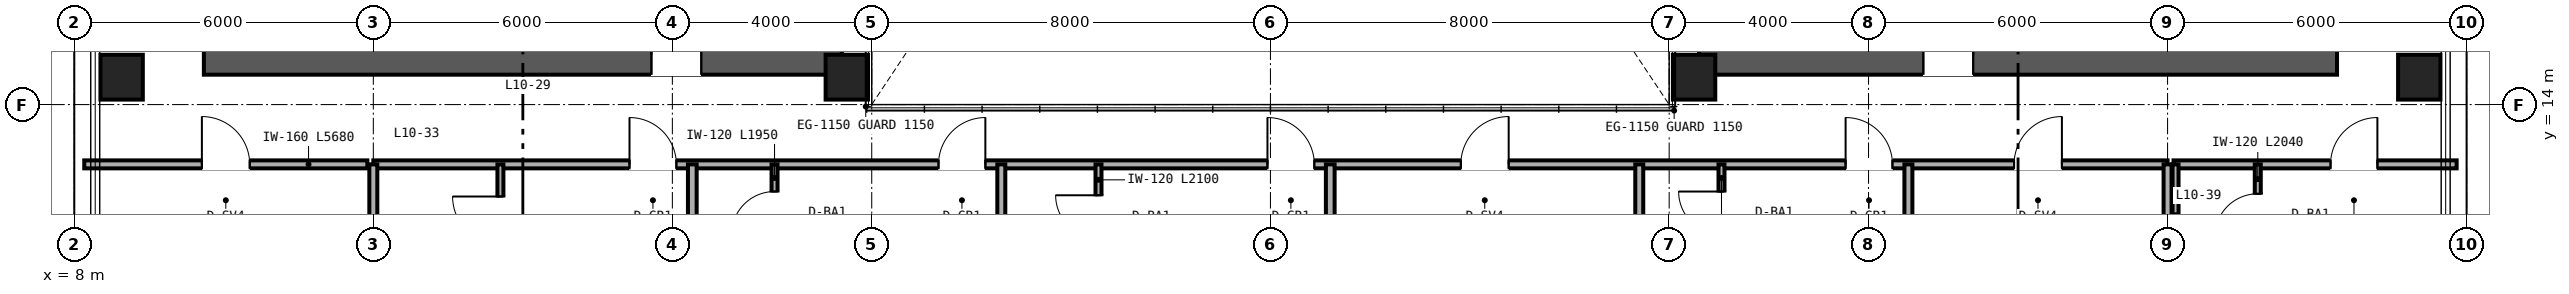
"""IFC4 building model, lengths in metres.
Left out: names, types, materials, properties, quantities, classifications, styles, units other than length and angle.
Written with IfcOpenShell. Run it as: python <this file> out.ifc"""

import sys

from ifc_helpers import new_model, si_unit, direction, frame, frame_2d, origin, origin_2d, place, context, subcontext, project, spatial, rectangle, hollow_rectangle, extrude, source, transform, mapped, element, fill, save


model = new_model("IFC4")
c1 = context("Model", 3, precision=1e-05, world=origin(), true_north=direction((0.0, 1.0)))
c2 = subcontext(c1, "Body", "Model", "MODEL_VIEW")
j1 = project(units=[si_unit("LENGTHUNIT", "METRE"), si_unit("PLANEANGLEUNIT", "RADIAN")], contexts=[c1])
p1 = place(None, origin())
s1 = spatial("IfcSite", under=j1, at=p1, CompositionType="ELEMENT")
p2 = place(p1, origin())
s2 = spatial("IfcBuilding", under=s1, at=p2, CompositionType="ELEMENT")
p3 = place(p2, frame((0.0, 0.0, 45.6)))
s3 = spatial("IfcBuildingStorey", under=s2, at=p3, CompositionType="ELEMENT", Elevation=45.6)
p4 = place(p3, frame((10.6, 15.0, 0.0), z_axis=(0.0, 0.0, 1.0), x_axis=(1.0, 0.0, 0.0)))
e1 = element("IfcWall", 1, at=p4, inside=s3, PredefinedType="SHEAR", context=c2, shape_type="SweptSolid", body=[
    extrude(rectangle(XDim=12.8, YDim=0.8, at=frame_2d((6.4, 0.0))), origin(), (0.0, 0.0, 1.0), 3.35),
])
p5 = place(p4, frame((8.98, 0.0, 0.0)))
e2 = element("IfcOpeningElement", 2, at=p5, cuts=e1, PredefinedType="OPENING", context=c2, shape_type="SweptSolid", body=[
    extrude(rectangle(XDim=1.0, YDim=2.15, at=frame_2d((0.5, 1.075))), frame((0.0, 0.41, 0.0), z_axis=(0.0, -1.0, 0.0), x_axis=(1.0, 0.0, 0.0)), (0.0, 0.0, 1.0), 0.82),
])
p6 = place(p3, frame((40.6, 15.0, 0.0), z_axis=(0.0, 0.0, 1.0), x_axis=(1.0, 0.0, 0.0)))
e3 = element("IfcWall", 3, at=p6, inside=s3, PredefinedType="SHEAR", context=c2, shape_type="SweptSolid", body=[
    extrude(rectangle(XDim=12.8, YDim=0.8, at=frame_2d((6.4, 0.0))), origin(), (0.0, 0.0, 1.0), 3.35),
])
p7 = place(p6, frame((4.5, 0.0, 0.0)))
e4 = element("IfcOpeningElement", 4, at=p7, cuts=e3, PredefinedType="OPENING", context=c2, shape_type="SweptSolid", body=[
    extrude(rectangle(XDim=1.0, YDim=2.15, at=frame_2d((0.5, 1.075))), frame((0.0, 0.41, 0.0), z_axis=(0.0, -1.0, 0.0), x_axis=(1.0, 0.0, 0.0)), (0.0, 0.0, 1.0), 0.82),
])
m1 = source(origin(), c2, "Body", "SweptSolid", [
    extrude(hollow_rectangle(XDim=0.85, YDim=0.9, WallThickness=0.04, at=origin_2d()), origin(), (0.0, 0.0, 1.0), 3.35),
])
for number, where, z_axis, x_axis in (
    (5, (8.95, 14.55, 0.0), (0.0, 0.0, 1.0), (1.0, 0.0, 0.0)),
    (6, (23.5, 14.55, 0.0), (0.0, 0.0, 1.0), (1.0, 0.0, 0.0)),
    (7, (40.5, 14.55, 0.0), (0.0, 0.0, 1.0), (1.0, 0.0, 0.0)),
    (8, (55.05, 14.55, 0.0), (0.0, 0.0, 1.0), (1.0, 0.0, 0.0)),
):
    element("IfcColumn", number, at=place(p3, frame(where, z_axis=z_axis, x_axis=x_axis)), inside=s3, PredefinedType="COLUMN", context=c2, shape_type="MappedRepresentation", body=[
        mapped(m1, transform((0.0, 0.0, 0.0), scale=1.0)),
    ])
p8 = place(p3, frame((8.2, 12.8, 0.0), z_axis=(0.0, 0.0, 1.0), x_axis=(1.0, 0.0, 0.0)))
e9 = element("IfcWall", 9, at=p8, inside=s3, PredefinedType="PARTITIONING", context=c2, shape_type="SweptSolid", body=[
    extrude(rectangle(XDim=5.68, YDim=0.16, at=frame_2d((2.84, 0.0))), origin(), (0.0, 0.0, 1.0), 3.35),
])
p9 = place(p8, frame((2.36, 0.0, 0.0)))
e10 = element("IfcOpeningElement", 10, at=p9, cuts=e9, PredefinedType="OPENING", context=c2, shape_type="SweptSolid", body=[
    extrude(rectangle(XDim=0.96, YDim=2.15, at=frame_2d((0.48, 1.075))), frame((0.0, 0.09, 0.0), z_axis=(0.0, -1.0, 0.0), x_axis=(1.0, 0.0, 0.0)), (0.0, 0.0, 1.0), 0.18),
])
p10 = place(p3, frame((50.12, 12.8, 0.0), z_axis=(0.0, 0.0, 1.0), x_axis=(1.0, 0.0, 0.0)))
e11 = element("IfcWall", 11, at=p10, inside=s3, PredefinedType="PARTITIONING", context=c2, shape_type="SweptSolid", body=[
    extrude(rectangle(XDim=5.68, YDim=0.16, at=frame_2d((2.84, 0.0))), origin(), (0.0, 0.0, 1.0), 3.35),
])
p11 = place(p10, frame((3.15, 0.0, 0.0)))
e12 = element("IfcOpeningElement", 12, at=p11, cuts=e11, PredefinedType="OPENING", context=c2, shape_type="SweptSolid", body=[
    extrude(rectangle(XDim=0.94, YDim=2.15, at=frame_2d((0.47, 1.075))), frame((0.0, 0.09, 0.0), z_axis=(0.0, -1.0, 0.0), x_axis=(1.0, 0.0, 0.0)), (0.0, 0.0, 1.0), 0.18),
])
p12 = place(p3, frame((51.81, 10.76, 0.0), z_axis=(0.0, 0.0, 1.0), x_axis=(0.0, 1.0, 0.0)))
e13 = element("IfcWall", 13, at=p12, inside=s3, PredefinedType="PARTITIONING", context=c2, shape_type="SweptSolid", body=[
    extrude(rectangle(XDim=2.04, YDim=0.12, at=frame_2d((1.02, 0.0))), origin(), (0.0, 0.0, 1.0), 3.35),
])
p13 = place(p12, frame((0.59, 0.0, 0.0)))
e14 = element("IfcOpeningElement", 14, at=p13, cuts=e13, PredefinedType="OPENING", context=c2, shape_type="SweptSolid", body=[
    extrude(rectangle(XDim=0.86, YDim=2.1, at=frame_2d((0.43, 1.05))), frame((0.0, 0.07, 0.0), z_axis=(0.0, -1.0, 0.0), x_axis=(1.0, 0.0, 0.0)), (0.0, 0.0, 1.0), 0.14),
])
p14 = place(p3, frame((50.16, 10.76, 0.0), z_axis=(0.0, 0.0, 1.0), x_axis=(0.0, 1.0, 0.0)))
e15 = element("IfcWall", 15, at=p14, inside=s3, PredefinedType="PARTITIONING", context=c2, shape_type="SweptSolid", body=[
    extrude(rectangle(XDim=2.04, YDim=0.12, at=frame_2d((1.02, 0.0))), origin(), (0.0, 0.0, 1.0), 3.35),
])
p15 = place(p3, frame((14.0, 12.8, 0.0), z_axis=(0.0, 0.0, 1.0), x_axis=(1.0, 0.0, 0.0)))
e16 = element("IfcWall", 16, at=p15, inside=s3, PredefinedType="PARTITIONING", context=c2, shape_type="SweptSolid", body=[
    extrude(rectangle(XDim=36.0, YDim=0.16, at=frame_2d((18.0, 0.0))), origin(), (0.0, 0.0, 1.0), 2.571),
])
p16 = place(p15, frame((5.14, 0.0, 0.0)))
e17 = element("IfcOpeningElement", 17, at=p16, cuts=e16, PredefinedType="OPENING", context=c2, shape_type="SweptSolid", body=[
    extrude(rectangle(XDim=0.94, YDim=2.15, at=frame_2d((0.47, 1.075))), frame((0.0, 0.09, 0.0), z_axis=(0.0, -1.0, 0.0), x_axis=(1.0, 0.0, 0.0)), (0.0, 0.0, 1.0), 0.18),
])
p17 = place(p15, frame((11.34, 0.0, 0.0)))
e18 = element("IfcOpeningElement", 18, at=p17, cuts=e16, PredefinedType="OPENING", context=c2, shape_type="SweptSolid", body=[
    extrude(rectangle(XDim=0.94, YDim=2.15, at=frame_2d((0.47, 1.075))), frame((0.0, 0.09, 0.0), z_axis=(0.0, -1.0, 0.0), x_axis=(1.0, 0.0, 0.0)), (0.0, 0.0, 1.0), 0.18),
])
p18 = place(p15, frame((17.94, 0.0, 0.0)))
e19 = element("IfcOpeningElement", 19, at=p18, cuts=e16, PredefinedType="OPENING", context=c2, shape_type="SweptSolid", body=[
    extrude(rectangle(XDim=0.94, YDim=2.15, at=frame_2d((0.47, 1.075))), frame((0.0, 0.09, 0.0), z_axis=(0.0, -1.0, 0.0), x_axis=(1.0, 0.0, 0.0)), (0.0, 0.0, 1.0), 0.18),
])
p19 = place(p15, frame((21.82, 0.0, 0.0)))
e20 = element("IfcOpeningElement", 20, at=p19, cuts=e16, PredefinedType="OPENING", context=c2, shape_type="SweptSolid", body=[
    extrude(rectangle(XDim=0.96, YDim=2.15, at=frame_2d((0.48, 1.075))), frame((0.0, 0.09, 0.0), z_axis=(0.0, -1.0, 0.0), x_axis=(1.0, 0.0, 0.0)), (0.0, 0.0, 1.0), 0.18),
])
p20 = place(p15, frame((29.54, 0.0, 0.0)))
e21 = element("IfcOpeningElement", 21, at=p20, cuts=e16, PredefinedType="OPENING", context=c2, shape_type="SweptSolid", body=[
    extrude(rectangle(XDim=0.94, YDim=2.15, at=frame_2d((0.47, 1.075))), frame((0.0, 0.09, 0.0), z_axis=(0.0, -1.0, 0.0), x_axis=(1.0, 0.0, 0.0)), (0.0, 0.0, 1.0), 0.18),
])
p21 = place(p15, frame((32.92, 0.0, 0.0)))
e22 = element("IfcOpeningElement", 22, at=p21, cuts=e16, PredefinedType="OPENING", context=c2, shape_type="SweptSolid", body=[
    extrude(rectangle(XDim=0.96, YDim=2.15, at=frame_2d((0.48, 1.075))), frame((0.0, 0.09, 0.0), z_axis=(0.0, -1.0, 0.0), x_axis=(1.0, 0.0, 0.0)), (0.0, 0.0, 1.0), 0.18),
])
for number, where, z_axis, x_axis in (
    (23, (14.0, 2.36, 0.0), (0.0, 0.0, 1.0), (0.0, 1.0, 0.0)),
    (24, (50.0, 2.36, 0.0), (0.0, 0.0, 1.0), (0.0, 1.0, 0.0)),
):
    element("IfcWall", number, at=place(p3, frame(where, z_axis=z_axis, x_axis=x_axis)), inside=s3, PredefinedType="PARTITIONING", context=c2, shape_type="SweptSolid", body=[
        extrude(rectangle(XDim=10.44, YDim=0.16, at=frame_2d((5.22, 0.0))), origin(), (0.0, 0.0, 1.0), 2.657),
    ])
p22 = place(p3, frame((20.4, 2.36, 0.0), z_axis=(0.0, 0.0, 1.0), x_axis=(0.0, 1.0, 0.0)))
e25 = element("IfcWall", 25, at=p22, inside=s3, PredefinedType="PARTITIONING", context=c2, shape_type="SweptSolid", body=[
    extrude(rectangle(XDim=10.44, YDim=0.175, at=frame_2d((5.22, 0.0))), origin(), (0.0, 0.0, 1.0), 2.813),
])
p23 = place(p3, frame((16.55, 10.55, 0.0), z_axis=(0.0, 0.0, 1.0), x_axis=(0.0, 1.0, 0.0)))
e26 = element("IfcWall", 26, at=p23, inside=s3, PredefinedType="PARTITIONING", context=c2, shape_type="SweptSolid", body=[
    extrude(rectangle(XDim=2.25, YDim=0.12, at=frame_2d((1.125, 0.0))), origin(), (0.0, 0.0, 1.0), 3.35),
])
p24 = place(p23, frame((0.645, 0.0, 0.0)))
e27 = element("IfcOpeningElement", 27, at=p24, cuts=e26, PredefinedType="OPENING", context=c2, shape_type="SweptSolid", body=[
    extrude(rectangle(XDim=0.96, YDim=2.15, at=frame_2d((0.48, 1.075))), frame((0.0, 0.07, 0.0), z_axis=(0.0, -1.0, 0.0), x_axis=(1.0, 0.0, 0.0)), (0.0, 0.0, 1.0), 0.14),
])
p25 = place(p3, frame((26.6, 2.36, 0.0), z_axis=(0.0, 0.0, 1.0), x_axis=(0.0, 1.0, 0.0)))
e28 = element("IfcWall", 28, at=p25, inside=s3, PredefinedType="PARTITIONING", context=c2, shape_type="SweptSolid", body=[
    extrude(rectangle(XDim=10.44, YDim=0.16, at=frame_2d((5.22, 0.0))), origin(), (0.0, 0.0, 1.0), 2.423),
])
p26 = place(p3, frame((22.05, 10.85, 0.0), z_axis=(0.0, 0.0, 1.0), x_axis=(0.0, 1.0, 0.0)))
e29 = element("IfcWall", 29, at=p26, inside=s3, PredefinedType="PARTITIONING", context=c2, shape_type="SweptSolid", body=[
    extrude(rectangle(XDim=1.95, YDim=0.12, at=frame_2d((0.975, 0.0))), origin(), (0.0, 0.0, 1.0), 3.35),
])
p27 = place(p26, frame((0.545, 0.0, 0.0)))
e30 = element("IfcOpeningElement", 30, at=p27, cuts=e29, PredefinedType="OPENING", context=c2, shape_type="SweptSolid", body=[
    extrude(rectangle(XDim=0.86, YDim=2.1, at=frame_2d((0.43, 1.05))), frame((0.0, 0.07, 0.0), z_axis=(0.0, -1.0, 0.0), x_axis=(1.0, 0.0, 0.0)), (0.0, 0.0, 1.0), 0.14),
])
p28 = place(p3, frame((33.2, 2.36, 0.0), z_axis=(0.0, 0.0, 1.0), x_axis=(0.0, 1.0, 0.0)))
e31 = element("IfcWall", 31, at=p28, inside=s3, PredefinedType="PARTITIONING", context=c2, shape_type="SweptSolid", body=[
    extrude(rectangle(XDim=10.44, YDim=0.175, at=frame_2d((5.22, 0.0))), origin(), (0.0, 0.0, 1.0), 2.423),
])
p29 = place(p3, frame((28.55, 10.7, 0.0), z_axis=(0.0, 0.0, 1.0), x_axis=(0.0, 1.0, 0.0)))
e32 = element("IfcWall", 32, at=p29, inside=s3, PredefinedType="PARTITIONING", context=c2, shape_type="SweptSolid", body=[
    extrude(rectangle(XDim=2.1, YDim=0.12, at=frame_2d((1.05, 0.0))), origin(), (0.0, 0.0, 1.0), 3.35),
])
p30 = place(p29, frame((0.62, 0.0, 0.0)))
e33 = element("IfcOpeningElement", 33, at=p30, cuts=e32, PredefinedType="OPENING", context=c2, shape_type="SweptSolid", body=[
    extrude(rectangle(XDim=0.86, YDim=2.1, at=frame_2d((0.43, 1.05))), frame((0.0, 0.07, 0.0), z_axis=(0.0, -1.0, 0.0), x_axis=(1.0, 0.0, 0.0)), (0.0, 0.0, 1.0), 0.14),
])
p31 = place(p3, frame((39.4, 2.36, 0.0), z_axis=(0.0, 0.0, 1.0), x_axis=(0.0, 1.0, 0.0)))
e34 = element("IfcWall", 34, at=p31, inside=s3, PredefinedType="PARTITIONING", context=c2, shape_type="SweptSolid", body=[
    extrude(rectangle(XDim=10.44, YDim=0.16, at=frame_2d((5.22, 0.0))), origin(), (0.0, 0.0, 1.0), 2.423),
])
p32 = place(p3, frame((44.8, 2.36, 0.0), z_axis=(0.0, 0.0, 1.0), x_axis=(0.0, 1.0, 0.0)))
e35 = element("IfcWall", 35, at=p32, inside=s3, PredefinedType="PARTITIONING", context=c2, shape_type="SweptSolid", body=[
    extrude(rectangle(XDim=10.44, YDim=0.16, at=frame_2d((5.22, 0.0))), origin(), (0.0, 0.0, 1.0), 2.657),
])
p33 = place(p3, frame((41.05, 10.85, 0.0), z_axis=(0.0, 0.0, 1.0), x_axis=(0.0, 1.0, 0.0)))
e36 = element("IfcWall", 36, at=p33, inside=s3, PredefinedType="PARTITIONING", context=c2, shape_type="SweptSolid", body=[
    extrude(rectangle(XDim=1.95, YDim=0.12, at=frame_2d((0.975, 0.0))), origin(), (0.0, 0.0, 1.0), 3.35),
])
p34 = place(p33, frame((0.545, 0.0, 0.0)))
e37 = element("IfcOpeningElement", 37, at=p34, cuts=e36, PredefinedType="OPENING", context=c2, shape_type="SweptSolid", body=[
    extrude(rectangle(XDim=0.86, YDim=2.1, at=frame_2d((0.43, 1.05))), frame((0.0, 0.07, 0.0), z_axis=(0.0, -1.0, 0.0), x_axis=(1.0, 0.0, 0.0)), (0.0, 0.0, 1.0), 0.14),
])
m2 = source(origin(), c2, "Body", "SweptSolid", [
    extrude(rectangle(XDim=1.0, YDim=2.15, at=frame_2d((0.5, 1.075))), frame((0.0, 0.025, 0.0), z_axis=(0.0, -1.0, 0.0), x_axis=(1.0, 0.0, 0.0)), (0.0, 0.0, 1.0), 0.05),
])
p35 = place(p5, origin())
e38 = element("IfcDoor", 38, at=p35, inside=s3, OperationType="SINGLE_SWING_LEFT", PredefinedType="DOOR", context=c2, shape_type="MappedRepresentation", body=[
    mapped(m2, transform((0.0, 0.0, 0.0), scale=1.0)),
])
fill(e2, e38)
p36 = place(p7, origin())
e39 = element("IfcDoor", 39, at=p36, inside=s3, OperationType="SINGLE_SWING_RIGHT", PredefinedType="DOOR", context=c2, shape_type="MappedRepresentation", body=[
    mapped(m2, transform((0.0, 0.0, 0.0), scale=1.0)),
])
fill(e4, e39)
m3 = source(origin(), c2, "Body", "SweptSolid", [
    extrude(rectangle(XDim=0.96, YDim=2.15, at=frame_2d((0.48, 1.075))), frame((0.0, 0.025, 0.0), z_axis=(0.0, -1.0, 0.0), x_axis=(1.0, 0.0, 0.0)), (0.0, 0.0, 1.0), 0.05),
])
p37 = place(p9, origin())
e40 = element("IfcDoor", 40, at=p37, inside=s3, OperationType="SINGLE_SWING_LEFT", PredefinedType="DOOR", context=c2, shape_type="MappedRepresentation", body=[
    mapped(m3, transform((0.0, 0.0, 0.0), scale=1.0)),
])
fill(e10, e40)
m4 = source(origin(), c2, "Body", "SweptSolid", [
    extrude(rectangle(XDim=0.86, YDim=2.1, at=frame_2d((0.43, 1.05))), frame((0.0, 0.025, 0.0), z_axis=(0.0, -1.0, 0.0), x_axis=(1.0, 0.0, 0.0)), (0.0, 0.0, 1.0), 0.05),
])
p38 = place(p13, origin())
e41 = element("IfcDoor", 41, at=p38, inside=s3, OperationType="SINGLE_SWING_LEFT", PredefinedType="DOOR", context=c2, shape_type="MappedRepresentation", body=[
    mapped(m4, transform((0.0, 0.0, 0.0), scale=1.0)),
])
fill(e14, e41)
m5 = source(origin(), c2, "Body", "SweptSolid", [
    extrude(rectangle(XDim=0.94, YDim=2.15, at=frame_2d((0.47, 1.075))), frame((0.0, 0.025, 0.0), z_axis=(0.0, -1.0, 0.0), x_axis=(1.0, 0.0, 0.0)), (0.0, 0.0, 1.0), 0.05),
])
p39 = place(p11, origin())
e42 = element("IfcDoor", 42, at=p39, inside=s3, OperationType="SINGLE_SWING_RIGHT", PredefinedType="DOOR", context=c2, shape_type="MappedRepresentation", body=[
    mapped(m5, transform((0.0, 0.0, 0.0), scale=1.0)),
])
fill(e12, e42)
p40 = place(p24, origin())
e43 = element("IfcDoor", 43, at=p40, inside=s3, OperationType="SINGLE_SWING_RIGHT", PredefinedType="DOOR", context=c2, shape_type="MappedRepresentation", body=[
    mapped(m3, transform((0.0, 0.0, 0.0), scale=1.0)),
])
fill(e27, e43)
p41 = place(p27, origin())
e44 = element("IfcDoor", 44, at=p41, inside=s3, OperationType="SINGLE_SWING_LEFT", PredefinedType="DOOR", context=c2, shape_type="MappedRepresentation", body=[
    mapped(m4, transform((0.0, 0.0, 0.0), scale=1.0)),
])
fill(e30, e44)
p42 = place(p30, origin())
e45 = element("IfcDoor", 45, at=p42, inside=s3, OperationType="SINGLE_SWING_RIGHT", PredefinedType="DOOR", context=c2, shape_type="MappedRepresentation", body=[
    mapped(m4, transform((0.0, 0.0, 0.0), scale=1.0)),
])
fill(e33, e45)
p43 = place(p34, origin())
e46 = element("IfcDoor", 46, at=p43, inside=s3, OperationType="SINGLE_SWING_RIGHT", PredefinedType="DOOR", context=c2, shape_type="MappedRepresentation", body=[
    mapped(m4, transform((0.0, 0.0, 0.0), scale=1.0)),
])
fill(e37, e46)
p44 = place(p16, origin())
e47 = element("IfcDoor", 47, at=p44, inside=s3, OperationType="SINGLE_SWING_LEFT", PredefinedType="DOOR", context=c2, shape_type="MappedRepresentation", body=[
    mapped(m5, transform((0.0, 0.0, 0.0), scale=1.0)),
])
fill(e17, e47)
p45 = place(p17, origin())
e48 = element("IfcDoor", 48, at=p45, inside=s3, OperationType="SINGLE_SWING_RIGHT", PredefinedType="DOOR", context=c2, shape_type="MappedRepresentation", body=[
    mapped(m5, transform((0.0, 0.0, 0.0), scale=1.0)),
])
fill(e18, e48)
p46 = place(p18, origin())
e49 = element("IfcDoor", 49, at=p46, inside=s3, OperationType="SINGLE_SWING_LEFT", PredefinedType="DOOR", context=c2, shape_type="MappedRepresentation", body=[
    mapped(m5, transform((0.0, 0.0, 0.0), scale=1.0)),
])
fill(e19, e49)
p47 = place(p19, origin())
e50 = element("IfcDoor", 50, at=p47, inside=s3, OperationType="SINGLE_SWING_RIGHT", PredefinedType="DOOR", context=c2, shape_type="MappedRepresentation", body=[
    mapped(m3, transform((0.0, 0.0, 0.0), scale=1.0)),
])
fill(e20, e50)
p48 = place(p20, origin())
e51 = element("IfcDoor", 51, at=p48, inside=s3, OperationType="SINGLE_SWING_LEFT", PredefinedType="DOOR", context=c2, shape_type="MappedRepresentation", body=[
    mapped(m5, transform((0.0, 0.0, 0.0), scale=1.0)),
])
fill(e21, e51)
p49 = place(p21, origin())
e52 = element("IfcDoor", 52, at=p49, inside=s3, OperationType="SINGLE_SWING_RIGHT", PredefinedType="DOOR", context=c2, shape_type="MappedRepresentation", body=[
    mapped(m3, transform((0.0, 0.0, 0.0), scale=1.0)),
])
fill(e22, e52)
save(model, sys.argv[1])
